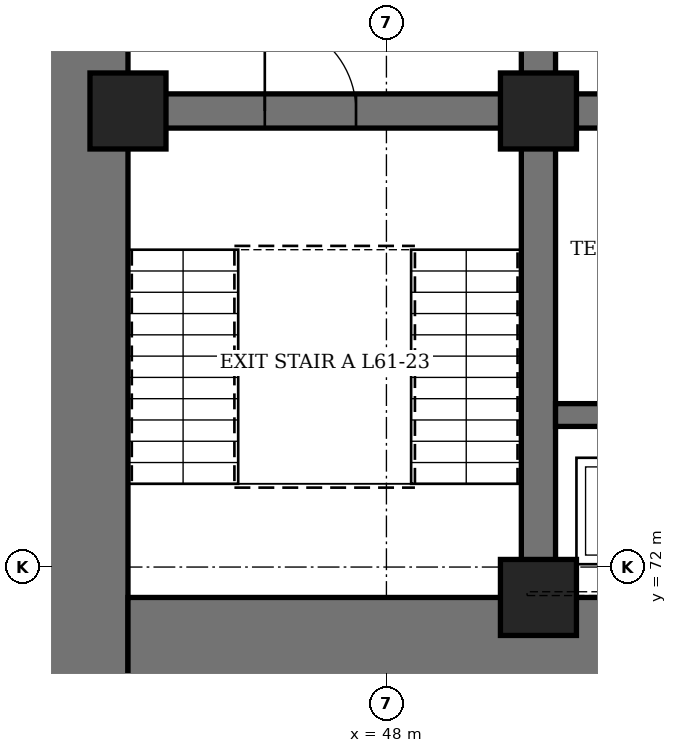
"""IFC4 building model, lengths in metres.
Left out: names, types, materials, properties, quantities, classifications, styles, units other than length and angle.
Written with IfcOpenShell. Run it as: python <this file> out.ifc"""

import sys

from ifc_helpers import new_model, si_unit, direction, frame, frame_2d, origin, origin_2d, place, context, subcontext, project, spatial, rectangle, hollow_rectangle, extrude, element, fill, save


model = new_model("IFC4")
c1 = context("Model", 3, precision=1e-05, world=origin(), true_north=direction((0.0, 1.0)))
c2 = subcontext(c1, "Body", "Model", "MODEL_VIEW")
j1 = project(units=[si_unit("LENGTHUNIT", "METRE"), si_unit("PLANEANGLEUNIT", "RADIAN")], contexts=[c1])
p1 = place(None, origin())
s1 = spatial("IfcSite", under=j1, at=p1, CompositionType="ELEMENT")
p2 = place(p1, origin())
s2 = spatial("IfcBuilding", under=s1, at=p2, CompositionType="ELEMENT")
p3 = place(p2, frame((0.0, 0.0, 271.3)))
s3 = spatial("IfcBuildingStorey", under=s2, at=p3, CompositionType="ELEMENT", Elevation=271.3)
p4 = place(p3, frame((44.0, 70.4, 0.0), z_axis=(0.0, 0.0, 1.0), x_axis=(0.0, 1.0, 0.0)))
e1 = element("IfcWall", 1, at=p4, inside=s3, PredefinedType="SHEAR", context=c2, shape_type="SweptSolid", body=[
    extrude(rectangle(XDim=19.2, YDim=1.2, at=frame_2d((9.6, 0.0))), origin(), (0.0, 0.0, 1.0), 4.2),
])
p5 = place(p4, frame((8.6, 0.0, 0.0)))
e2 = element("IfcOpeningElement", 2, at=p5, cuts=e1, PredefinedType="OPENING", context=c2, shape_type="SweptSolid", body=[
    extrude(rectangle(XDim=2.0, YDim=2.4, at=frame_2d((1.0, 1.2))), frame((0.0, 0.61, 0.0), z_axis=(0.0, -1.0, 0.0), x_axis=(1.0, 0.0, 0.0)), (0.0, 0.0, 1.0), 1.22),
])
p6 = place(p3, frame((44.6, 71.0, 0.0), z_axis=(0.0, 0.0, 1.0), x_axis=(1.0, 0.0, 0.0)))
e3 = element("IfcWall", 3, at=p6, inside=s3, PredefinedType="SHEAR", context=c2, shape_type="SweptSolid", body=[
    extrude(rectangle(XDim=22.8, YDim=1.2, at=frame_2d((11.4, 0.0))), origin(), (0.0, 0.0, 1.0), 4.2),
])
p7 = place(p6, frame((6.35, 0.0, 0.0)))
e4 = element("IfcOpeningElement", 4, at=p7, cuts=e3, PredefinedType="OPENING", context=c2, shape_type="SweptSolid", body=[
    extrude(rectangle(XDim=1.1, YDim=2.2, at=frame_2d((0.55, 1.1))), frame((0.0, 0.61, 0.0), z_axis=(0.0, -1.0, 0.0), x_axis=(1.0, 0.0, 0.0)), (0.0, 0.0, 1.0), 1.22),
])
p8 = place(p6, frame((9.35, 0.0, 0.0)))
e5 = element("IfcOpeningElement", 5, at=p8, cuts=e3, PredefinedType="OPENING", context=c2, shape_type="SweptSolid", body=[
    extrude(rectangle(XDim=1.1, YDim=2.2, at=frame_2d((0.55, 1.1))), frame((0.0, 0.61, 0.0), z_axis=(0.0, -1.0, 0.0), x_axis=(1.0, 0.0, 0.0)), (0.0, 0.0, 1.0), 1.22),
])
p9 = place(p6, frame((12.35, 0.0, 0.0)))
e6 = element("IfcOpeningElement", 6, at=p9, cuts=e3, PredefinedType="OPENING", context=c2, shape_type="SweptSolid", body=[
    extrude(rectangle(XDim=1.1, YDim=2.2, at=frame_2d((0.55, 1.1))), frame((0.0, 0.61, 0.0), z_axis=(0.0, -1.0, 0.0), x_axis=(1.0, 0.0, 0.0)), (0.0, 0.0, 1.0), 1.22),
])
p10 = place(p6, frame((15.35, 0.0, 0.0)))
e7 = element("IfcOpeningElement", 7, at=p10, cuts=e3, PredefinedType="OPENING", context=c2, shape_type="SweptSolid", body=[
    extrude(rectangle(XDim=1.1, YDim=2.2, at=frame_2d((0.55, 1.1))), frame((0.0, 0.61, 0.0), z_axis=(0.0, -1.0, 0.0), x_axis=(1.0, 0.0, 0.0)), (0.0, 0.0, 1.0), 1.22),
])
p11 = place(p3, frame((50.0, 71.6, 0.0), z_axis=(0.0, 0.0, 1.0), x_axis=(0.0, 1.0, 0.0)))
e8 = element("IfcWall", 8, at=p11, inside=s3, PredefinedType="SHEAR", context=c2, shape_type="SweptSolid", body=[
    extrude(rectangle(XDim=16.8, YDim=0.45, at=frame_2d((8.4, 0.0))), origin(), (0.0, 0.0, 1.0), 4.2),
])
p12 = place(p11, frame((7.5, 0.0, 0.0)))
e9 = element("IfcOpeningElement", 9, at=p12, cuts=e8, PredefinedType="OPENING", context=c2, shape_type="SweptSolid", body=[
    extrude(rectangle(XDim=1.8, YDim=2.4, at=frame_2d((0.9, 1.2))), frame((0.0, 0.235, 0.0), z_axis=(0.0, -1.0, 0.0), x_axis=(1.0, 0.0, 0.0)), (0.0, 0.0, 1.0), 0.47),
])
p13 = place(p3, frame((44.6, 78.0, 0.0), z_axis=(0.0, 0.0, 1.0), x_axis=(1.0, 0.0, 0.0)))
e10 = element("IfcWall", 10, at=p13, inside=s3, PredefinedType="SHEAR", context=c2, shape_type="SweptSolid", body=[
    extrude(rectangle(XDim=5.175, YDim=0.45, at=frame_2d((2.587, 0.0))), origin(), (0.0, 0.0, 1.0), 4.2),
])
p14 = place(p13, frame((1.8, 0.0, 0.0)))
e11 = element("IfcOpeningElement", 11, at=p14, cuts=e10, PredefinedType="OPENING", context=c2, shape_type="SweptSolid", body=[
    extrude(rectangle(XDim=1.2, YDim=2.1, at=frame_2d((0.6, 1.05))), frame((0.0, 0.235, 0.0), z_axis=(0.0, -1.0, 0.0), x_axis=(1.0, 0.0, 0.0)), (0.0, 0.0, 1.0), 0.47),
])
p15 = place(p3, frame((50.225, 78.0, 0.0), z_axis=(0.0, 0.0, 1.0), x_axis=(1.0, 0.0, 0.0)))
e12 = element("IfcWall", 12, at=p15, inside=s3, PredefinedType="SHEAR", context=c2, shape_type="SweptSolid", body=[
    extrude(rectangle(XDim=11.55, YDim=0.45, at=frame_2d((5.775, 0.0))), origin(), (0.0, 0.0, 1.0), 4.2),
])
p16 = place(p15, frame((0.825, 0.0, 0.0)))
e13 = element("IfcOpeningElement", 13, at=p16, cuts=e12, PredefinedType="OPENING", context=c2, shape_type="SweptSolid", body=[
    extrude(rectangle(XDim=0.9, YDim=2.1, at=frame_2d((0.45, 1.05))), frame((0.0, 0.235, 0.0), z_axis=(0.0, -1.0, 0.0), x_axis=(1.0, 0.0, 0.0)), (0.0, 0.0, 1.0), 0.47),
])
p17 = place(p15, frame((3.825, 0.0, 0.0)))
e14 = element("IfcOpeningElement", 14, at=p17, cuts=e12, PredefinedType="OPENING", context=c2, shape_type="SweptSolid", body=[
    extrude(rectangle(XDim=0.9, YDim=2.1, at=frame_2d((0.45, 1.05))), frame((0.0, 0.235, 0.0), z_axis=(0.0, -1.0, 0.0), x_axis=(1.0, 0.0, 0.0)), (0.0, 0.0, 1.0), 0.47),
])
p18 = place(p15, frame((6.825, 0.0, 0.0)))
e15 = element("IfcOpeningElement", 15, at=p18, cuts=e12, PredefinedType="OPENING", context=c2, shape_type="SweptSolid", body=[
    extrude(rectangle(XDim=0.9, YDim=2.1, at=frame_2d((0.45, 1.05))), frame((0.0, 0.235, 0.0), z_axis=(0.0, -1.0, 0.0), x_axis=(1.0, 0.0, 0.0)), (0.0, 0.0, 1.0), 0.47),
])
p19 = place(p15, frame((9.825, 0.0, 0.0)))
e16 = element("IfcOpeningElement", 16, at=p19, cuts=e12, PredefinedType="OPENING", context=c2, shape_type="SweptSolid", body=[
    extrude(rectangle(XDim=0.9, YDim=2.1, at=frame_2d((0.45, 1.05))), frame((0.0, 0.235, 0.0), z_axis=(0.0, -1.0, 0.0), x_axis=(1.0, 0.0, 0.0)), (0.0, 0.0, 1.0), 0.47),
])
p20 = place(p3, frame((50.225, 74.0, 0.0), z_axis=(0.0, 0.0, 1.0), x_axis=(1.0, 0.0, 0.0)))
e17 = element("IfcWall", 17, at=p20, inside=s3, PredefinedType="SHEAR", context=c2, shape_type="SweptSolid", body=[
    extrude(rectangle(XDim=11.55, YDim=0.3, at=frame_2d((5.775, 0.0))), origin(), (0.0, 0.0, 1.0), 4.2),
])
for number, where, z_axis, x_axis in (
    (18, (44.6, 78.0, 0.0), (0.0, 0.0, 1.0), (1.0, 0.0, 0.0)),
    (19, (50.0, 71.6, 0.0), (0.0, 0.0, 1.0), (1.0, 0.0, 0.0)),
    (20, (50.0, 78.0, 0.0), (0.0, 0.0, 1.0), (1.0, 0.0, 0.0)),
):
    element("IfcColumn", number, at=place(p3, frame(where, z_axis=z_axis, x_axis=x_axis)), inside=s3, PredefinedType="COLUMN", context=c2, shape_type="SweptSolid", body=[
        extrude(hollow_rectangle(XDim=1.0, YDim=1.0, WallThickness=0.15, at=origin_2d()), origin(), (0.0, 0.0, 1.0), 4.2),
    ])
p21 = place(p14, origin())
e21 = element("IfcDoor", 21, at=p21, inside=s3, OperationType="SINGLE_SWING_LEFT", PredefinedType="DOOR", context=c2, shape_type="SweptSolid", body=[
    extrude(rectangle(XDim=1.2, YDim=2.1, at=frame_2d((0.6, 1.05))), frame((0.0, 0.225, 0.0), z_axis=(0.0, -1.0, 0.0), x_axis=(1.0, 0.0, 0.0)), (0.0, 0.0, 1.0), 0.449),
])
fill(e11, e21)
save(model, sys.argv[1])
